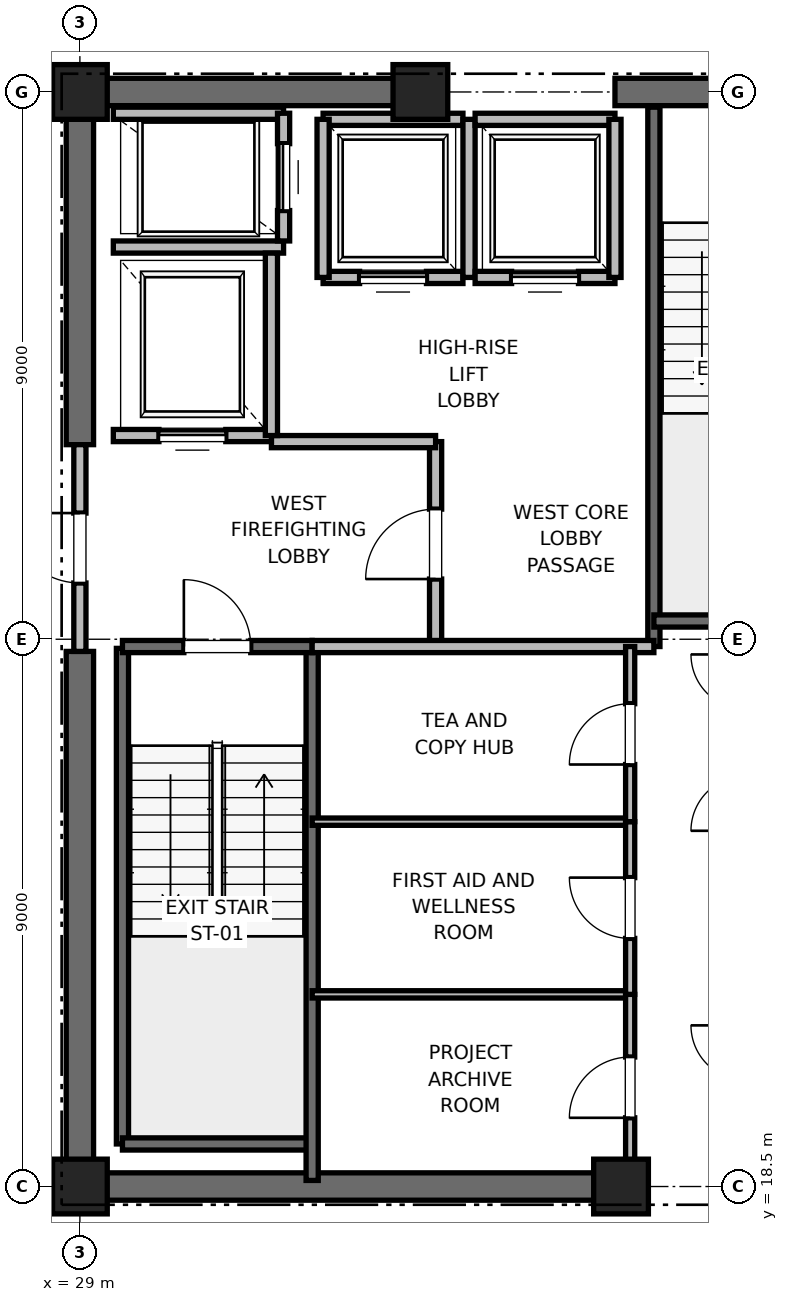
"""IFC4 building model, lengths in metres.
Left out: names, types, materials, properties, quantities, classifications, styles, units other than length and angle.
Written with IfcOpenShell. Run it as: python <this file> out.ifc"""

import sys

from ifc_helpers import new_model, si_unit, direction, frame, frame_2d, origin, origin_2d, place, context, subcontext, project, spatial, rectangle, extrude, element, fill, save


model = new_model("IFC4")
c1 = context("Model", 3, precision=1e-05, world=origin(), true_north=direction((0.0, 1.0)))
c2 = subcontext(c1, "Body", "Model", "MODEL_VIEW")
j1 = project(units=[si_unit("LENGTHUNIT", "METRE"), si_unit("PLANEANGLEUNIT", "RADIAN")], contexts=[c1])
p1 = place(None, origin())
s1 = spatial("IfcSite", under=j1, at=p1, CompositionType="ELEMENT")
p2 = place(p1, origin())
s2 = spatial("IfcBuilding", under=s1, at=p2, CompositionType="ELEMENT")
p3 = place(p2, frame((0.0, 0.0, 259.2)))
s3 = spatial("IfcBuildingStorey", under=s2, at=p3, CompositionType="ELEMENT", Elevation=259.2)
for number, where, z_axis, x_axis in (
    (1, (29.0, 18.5, 0.0), (0.0, 0.0, 1.0), (1.0, 0.0, 0.0)),
    (2, (29.0, 36.5, 0.0), (0.0, 0.0, 1.0), (1.0, 0.0, 0.0)),
    (3, (37.9, 18.5, 0.0), (0.0, 0.0, 1.0), (1.0, 0.0, 0.0)),
    (4, (34.6, 36.5, 0.0), (0.0, 0.0, 1.0), (1.0, 0.0, 0.0)),
):
    element("IfcColumn", number, at=place(p3, frame(where, z_axis=z_axis, x_axis=x_axis)), inside=s3, PredefinedType="PILASTER", context=c2, shape_type="SweptSolid", body=[
        extrude(rectangle(XDim=0.9, YDim=0.9, at=origin_2d()), origin(), (0.0, 0.0, 1.0), 4.0),
    ])
p4 = place(p3, frame((29.0, 18.5, 0.0), z_axis=(0.0, 0.0, 1.0), x_axis=(1.0, 0.0, 0.0)))
e5 = element("IfcWall", 5, at=p4, inside=s3, PredefinedType="SHEAR", context=c2, shape_type="SweptSolid", body=[
    extrude(rectangle(XDim=9.2, YDim=0.45, at=frame_2d((4.6, 0.0))), origin(), (0.0, 0.0, 1.0), 3.785),
])
p5 = place(p3, frame((29.0, 36.5, 0.0), z_axis=(0.0, 0.0, 1.0), x_axis=(1.0, 0.0, 0.0)))
e6 = element("IfcWall", 6, at=p5, inside=s3, PredefinedType="SHEAR", context=c2, shape_type="SweptSolid", body=[
    extrude(rectangle(XDim=5.8, YDim=0.45, at=frame_2d((2.9, 0.0))), origin(), (0.0, 0.0, 1.0), 3.785),
])
p6 = place(p3, frame((37.8, 36.5, 0.0), z_axis=(0.0, 0.0, 1.0), x_axis=(1.0, 0.0, 0.0)))
e7 = element("IfcWall", 7, at=p6, inside=s3, PredefinedType="SHEAR", context=c2, shape_type="SweptSolid", body=[
    extrude(rectangle(XDim=4.4, YDim=0.45, at=frame_2d((2.2, 0.0))), origin(), (0.0, 0.0, 1.0), 3.785),
])
p7 = place(p6, frame((1.65, 0.0, 0.0)))
e8 = element("IfcOpeningElement", 8, at=p7, cuts=e7, PredefinedType="OPENING", context=c2, shape_type="SweptSolid", body=[
    extrude(rectangle(XDim=1.1, YDim=2.15, at=frame_2d((0.55, 1.075))), frame((0.0, 0.225, 0.0), z_axis=(0.0, -1.0, 0.0), x_axis=(1.0, 0.0, 0.0)), (0.0, 0.0, 1.0), 0.45),
])
p8 = place(p3, frame((29.0, 18.5, 0.0), z_axis=(0.0, 0.0, 1.0), x_axis=(0.0, 1.0, 0.0)))
e9 = element("IfcWall", 9, at=p8, inside=s3, PredefinedType="SHEAR", context=c2, shape_type="SweptSolid", body=[
    extrude(rectangle(XDim=8.8, YDim=0.45, at=frame_2d((4.4, 0.0))), origin(), (0.0, 0.0, 1.0), 3.785),
])
p9 = place(p3, frame((29.0, 30.7, 0.0), z_axis=(0.0, 0.0, 1.0), x_axis=(0.0, 1.0, 0.0)))
e10 = element("IfcWall", 10, at=p9, inside=s3, PredefinedType="SHEAR", context=c2, shape_type="SweptSolid", body=[
    extrude(rectangle(XDim=5.8, YDim=0.45, at=frame_2d((2.9, 0.0))), origin(), (0.0, 0.0, 1.0), 3.785),
])
p10 = place(p3, frame((29.7, 19.2, 0.0), z_axis=(0.0, 0.0, 1.0), x_axis=(0.0, 1.0, 0.0)))
e11 = element("IfcWall", 11, at=p10, inside=s3, PredefinedType="SOLIDWALL", context=c2, shape_type="SweptSolid", body=[
    extrude(rectangle(XDim=8.15, YDim=0.2, at=frame_2d((4.075, 0.0))), origin(), (0.0, 0.0, 1.0), 3.785),
])
p11 = place(p3, frame((29.7, 19.2, 0.0), z_axis=(0.0, 0.0, 1.0), x_axis=(1.0, 0.0, 0.0)))
e12 = element("IfcWall", 12, at=p11, inside=s3, PredefinedType="SOLIDWALL", context=c2, shape_type="SweptSolid", body=[
    extrude(rectangle(XDim=3.12, YDim=0.2, at=frame_2d((1.56, 0.0))), origin(), (0.0, 0.0, 1.0), 3.785),
])
p12 = place(p3, frame((32.82, 18.6, 0.0), z_axis=(0.0, 0.0, 1.0), x_axis=(0.0, 1.0, 0.0)))
e13 = element("IfcWall", 13, at=p12, inside=s3, PredefinedType="SOLIDWALL", context=c2, shape_type="SweptSolid", body=[
    extrude(rectangle(XDim=8.78, YDim=0.2, at=frame_2d((4.39, 0.0))), origin(), (0.0, 0.0, 1.0), 3.785),
])
p13 = place(p3, frame((29.7, 27.38, 0.0), z_axis=(0.0, 0.0, 1.0), x_axis=(1.0, 0.0, 0.0)))
e14 = element("IfcWall", 14, at=p13, inside=s3, PredefinedType="SOLIDWALL", context=c2, shape_type="SweptSolid", body=[
    extrude(rectangle(XDim=3.12, YDim=0.2, at=frame_2d((1.56, 0.0))), origin(), (0.0, 0.0, 1.0), 3.785),
])
p14 = place(p13, frame((1.01, 0.0, 0.0)))
e15 = element("IfcOpeningElement", 15, at=p14, cuts=e14, PredefinedType="OPENING", context=c2, shape_type="SweptSolid", body=[
    extrude(rectangle(XDim=1.1, YDim=2.15, at=frame_2d((0.55, 1.075))), frame((0.0, 0.1, 0.0), z_axis=(0.0, -1.0, 0.0), x_axis=(1.0, 0.0, 0.0)), (0.0, 0.0, 1.0), 0.2),
])
p15 = place(p3, frame((38.44, 27.38, 0.0), z_axis=(0.0, 0.0, 1.0), x_axis=(0.0, 1.0, 0.0)))
e16 = element("IfcWall", 16, at=p15, inside=s3, PredefinedType="SOLIDWALL", context=c2, shape_type="SweptSolid", body=[
    extrude(rectangle(XDim=8.87, YDim=0.2, at=frame_2d((4.435, 0.0))), origin(), (0.0, 0.0, 1.0), 3.785),
])
p16 = place(p3, frame((38.44, 27.8, 0.0), z_axis=(0.0, 0.0, 1.0), x_axis=(1.0, 0.0, 0.0)))
e17 = element("IfcWall", 17, at=p16, inside=s3, PredefinedType="SOLIDWALL", context=c2, shape_type="SweptSolid", body=[
    extrude(rectangle(XDim=3.32, YDim=0.2, at=frame_2d((1.66, 0.0))), origin(), (0.0, 0.0, 1.0), 3.785),
])
p17 = place(p3, frame((34.85, 27.38, 0.0), z_axis=(0.0, 0.0, 1.0), x_axis=(0.0, 1.0, 0.0)))
e18 = element("IfcWall", 18, at=p17, inside=s3, PredefinedType="PARTITIONING", context=c2, shape_type="SweptSolid", body=[
    extrude(rectangle(XDim=3.37, YDim=0.2, at=frame_2d((1.685, 0.0))), origin(), (0.0, 0.0, 1.0), 3.785),
])
p18 = place(p17, frame((1.11, 0.0, 0.0)))
e19 = element("IfcOpeningElement", 19, at=p18, cuts=e18, PredefinedType="OPENING", context=c2, shape_type="SweptSolid", body=[
    extrude(rectangle(XDim=1.15, YDim=2.2, at=frame_2d((0.575, 1.1))), frame((0.0, 0.1, 0.0), z_axis=(0.0, -1.0, 0.0), x_axis=(1.0, 0.0, 0.0)), (0.0, 0.0, 1.0), 0.2),
])
p19 = place(p3, frame((29.0, 27.3, 0.0), z_axis=(0.0, 0.0, 1.0), x_axis=(0.0, 1.0, 0.0)))
e20 = element("IfcWall", 20, at=p19, inside=s3, PredefinedType="PARTITIONING", context=c2, shape_type="SweptSolid", body=[
    extrude(rectangle(XDim=3.4, YDim=0.2, at=frame_2d((1.7, 0.0))), origin(), (0.0, 0.0, 1.0), 2.865),
])
p20 = place(p19, frame((1.125, 0.0, 0.0)))
e21 = element("IfcOpeningElement", 21, at=p20, cuts=e20, PredefinedType="OPENING", context=c2, shape_type="SweptSolid", body=[
    extrude(rectangle(XDim=1.15, YDim=2.2, at=frame_2d((0.575, 1.1))), frame((0.0, 0.1, 0.0), z_axis=(0.0, -1.0, 0.0), x_axis=(1.0, 0.0, 0.0)), (0.0, 0.0, 1.0), 0.2),
])
p21 = place(p3, frame((32.82, 27.38, 0.0), z_axis=(0.0, 0.0, 1.0), x_axis=(1.0, 0.0, 0.0)))
e22 = element("IfcWall", 22, at=p21, inside=s3, PredefinedType="PARTITIONING", context=c2, shape_type="SweptSolid", body=[
    extrude(rectangle(XDim=5.62, YDim=0.2, at=frame_2d((2.81, 0.0))), origin(), (0.0, 0.0, 1.0), 3.785),
])
p22 = place(p3, frame((32.15, 30.75, 0.0), z_axis=(0.0, 0.0, 1.0), x_axis=(1.0, 0.0, 0.0)))
e23 = element("IfcWall", 23, at=p22, inside=s3, PredefinedType="PARTITIONING", context=c2, shape_type="SweptSolid", body=[
    extrude(rectangle(XDim=2.7, YDim=0.2, at=frame_2d((1.35, 0.0))), origin(), (0.0, 0.0, 1.0), 3.785),
])
p23 = place(p3, frame((29.55, 30.85, 0.0), z_axis=(0.0, 0.0, 1.0), x_axis=(1.0, 0.0, 0.0)))
e24 = element("IfcWall", 24, at=p23, inside=s3, PredefinedType="SOLIDWALL", context=c2, shape_type="SweptSolid", body=[
    extrude(rectangle(XDim=2.6, YDim=0.2, at=frame_2d((1.3, 0.0))), origin(), (0.0, 0.0, 1.0), 2.865),
])
p24 = place(p23, frame((0.75, 0.0, 0.0)))
e25 = element("IfcOpeningElement", 25, at=p24, cuts=e24, PredefinedType="OPENING", context=c2, shape_type="SweptSolid", body=[
    extrude(rectangle(XDim=1.1, YDim=2.2, at=frame_2d((0.55, 1.1))), frame((0.0, 0.1, 0.0), z_axis=(0.0, -1.0, 0.0), x_axis=(1.0, 0.0, 0.0)), (0.0, 0.0, 1.0), 0.2),
])
p25 = place(p3, frame((29.55, 33.95, 0.0), z_axis=(0.0, 0.0, 1.0), x_axis=(1.0, 0.0, 0.0)))
e26 = element("IfcWall", 26, at=p25, inside=s3, PredefinedType="SOLIDWALL", context=c2, shape_type="SweptSolid", body=[
    extrude(rectangle(XDim=2.8, YDim=0.2, at=frame_2d((1.4, 0.0))), origin(), (0.0, 0.0, 1.0), 3.785),
])
p26 = place(p3, frame((32.15, 30.85, 0.0), z_axis=(0.0, 0.0, 1.0), x_axis=(0.0, 1.0, 0.0)))
e27 = element("IfcWall", 27, at=p26, inside=s3, PredefinedType="SOLIDWALL", context=c2, shape_type="SweptSolid", body=[
    extrude(rectangle(XDim=3.0, YDim=0.2, at=frame_2d((1.5, 0.0))), origin(), (0.0, 0.0, 1.0), 3.785),
])
p27 = place(p3, frame((32.35, 36.15, 0.0), z_axis=(0.0, 0.0, 1.0), x_axis=(-1.0, 0.0, 0.0)))
e28 = element("IfcWall", 28, at=p27, inside=s3, PredefinedType="SOLIDWALL", context=c2, shape_type="SweptSolid", body=[
    extrude(rectangle(XDim=2.8, YDim=0.2, at=frame_2d((1.4, 0.0))), origin(), (0.0, 0.0, 1.0), 3.148),
])
p28 = place(p3, frame((32.35, 34.05, 0.0), z_axis=(0.0, 0.0, 1.0), x_axis=(0.0, 1.0, 0.0)))
e29 = element("IfcWall", 29, at=p28, inside=s3, PredefinedType="SOLIDWALL", context=c2, shape_type="SweptSolid", body=[
    extrude(rectangle(XDim=2.1, YDim=0.2, at=frame_2d((1.05, 0.0))), origin(), (0.0, 0.0, 1.0), 3.785),
])
p29 = place(p28, frame((0.5, 0.0, 0.0)))
e30 = element("IfcOpeningElement", 30, at=p29, cuts=e29, PredefinedType="OPENING", context=c2, shape_type="SweptSolid", body=[
    extrude(rectangle(XDim=1.1, YDim=2.2, at=frame_2d((0.55, 1.1))), frame((0.0, 0.1, 0.0), z_axis=(0.0, -1.0, 0.0), x_axis=(1.0, 0.0, 0.0)), (0.0, 0.0, 1.0), 0.2),
])
p30 = place(p3, frame((33.0, 33.45, 0.0), z_axis=(0.0, 0.0, 1.0), x_axis=(1.0, 0.0, 0.0)))
e31 = element("IfcWall", 31, at=p30, inside=s3, PredefinedType="SOLIDWALL", context=c2, shape_type="SweptSolid", body=[
    extrude(rectangle(XDim=2.3, YDim=0.2, at=frame_2d((1.15, 0.0))), origin(), (0.0, 0.0, 1.0), 3.785),
])
p31 = place(p30, frame((0.6, 0.0, 0.0)))
e32 = element("IfcOpeningElement", 32, at=p31, cuts=e31, PredefinedType="OPENING", context=c2, shape_type="SweptSolid", body=[
    extrude(rectangle(XDim=1.1, YDim=2.2, at=frame_2d((0.55, 1.1))), frame((0.0, 0.1, 0.0), z_axis=(0.0, -1.0, 0.0), x_axis=(1.0, 0.0, 0.0)), (0.0, 0.0, 1.0), 0.2),
])
p32 = place(p3, frame((35.3, 36.05, 0.0), z_axis=(0.0, 0.0, 1.0), x_axis=(-1.0, 0.0, 0.0)))
e33 = element("IfcWall", 33, at=p32, inside=s3, PredefinedType="SOLIDWALL", context=c2, shape_type="SweptSolid", body=[
    extrude(rectangle(XDim=2.3, YDim=0.2, at=frame_2d((1.15, 0.0))), origin(), (0.0, 0.0, 1.0), 2.865),
])
p33 = place(p3, frame((33.0, 36.05, 0.0), z_axis=(0.0, 0.0, 1.0), x_axis=(0.0, -1.0, 0.0)))
e34 = element("IfcWall", 34, at=p33, inside=s3, PredefinedType="SOLIDWALL", context=c2, shape_type="SweptSolid", body=[
    extrude(rectangle(XDim=2.6, YDim=0.2, at=frame_2d((1.3, 0.0))), origin(), (0.0, 0.0, 1.0), 3.785),
])
p34 = place(p3, frame((35.4, 33.45, 0.0), z_axis=(0.0, 0.0, 1.0), x_axis=(0.0, 1.0, 0.0)))
e35 = element("IfcWall", 35, at=p34, inside=s3, PredefinedType="SOLIDWALL", context=c2, shape_type="SweptSolid", body=[
    extrude(rectangle(XDim=2.6, YDim=0.2, at=frame_2d((1.3, 0.0))), origin(), (0.0, 0.0, 1.0), 2.865),
])
p35 = place(p3, frame((35.5, 33.45, 0.0), z_axis=(0.0, 0.0, 1.0), x_axis=(1.0, 0.0, 0.0)))
e36 = element("IfcWall", 36, at=p35, inside=s3, PredefinedType="SOLIDWALL", context=c2, shape_type="SweptSolid", body=[
    extrude(rectangle(XDim=2.3, YDim=0.2, at=frame_2d((1.15, 0.0))), origin(), (0.0, 0.0, 1.0), 3.785),
])
p36 = place(p35, frame((0.6, 0.0, 0.0)))
e37 = element("IfcOpeningElement", 37, at=p36, cuts=e36, PredefinedType="OPENING", context=c2, shape_type="SweptSolid", body=[
    extrude(rectangle(XDim=1.1, YDim=2.2, at=frame_2d((0.55, 1.1))), frame((0.0, 0.1, 0.0), z_axis=(0.0, -1.0, 0.0), x_axis=(1.0, 0.0, 0.0)), (0.0, 0.0, 1.0), 0.2),
])
p37 = place(p3, frame((37.8, 36.05, 0.0), z_axis=(0.0, 0.0, 1.0), x_axis=(-1.0, 0.0, 0.0)))
e38 = element("IfcWall", 38, at=p37, inside=s3, PredefinedType="SOLIDWALL", context=c2, shape_type="SweptSolid", body=[
    extrude(rectangle(XDim=2.3, YDim=0.2, at=frame_2d((1.15, 0.0))), origin(), (0.0, 0.0, 1.0), 2.865),
])
p38 = place(p3, frame((37.8, 33.45, 0.0), z_axis=(0.0, 0.0, 1.0), x_axis=(0.0, 1.0, 0.0)))
e39 = element("IfcWall", 39, at=p38, inside=s3, PredefinedType="SOLIDWALL", context=c2, shape_type="SweptSolid", body=[
    extrude(rectangle(XDim=2.6, YDim=0.2, at=frame_2d((1.3, 0.0))), origin(), (0.0, 0.0, 1.0), 2.865),
])
for number, where, z_axis, x_axis in (
    (40, (32.82, 21.66, 0.0), (0.0, 0.0, 1.0), (1.0, 0.0, 0.0)),
    (41, (32.82, 24.5, 0.0), (0.0, 0.0, 1.0), (1.0, 0.0, 0.0)),
):
    element("IfcWall", number, at=place(p3, frame(where, z_axis=z_axis, x_axis=x_axis)), inside=s3, PredefinedType="PARTITIONING", context=c2, shape_type="SweptSolid", body=[
        extrude(rectangle(XDim=5.23, YDim=0.12, at=frame_2d((2.615, 0.0))), origin(), (0.0, 0.0, 1.0), 2.85),
    ])
p39 = place(p3, frame((38.05, 18.6, 0.0), z_axis=(0.0, 0.0, 1.0), x_axis=(0.0, 1.0, 0.0)))
e42 = element("IfcWall", 42, at=p39, inside=s3, PredefinedType="PARTITIONING", context=c2, shape_type="SweptSolid", body=[
    extrude(rectangle(XDim=3.06, YDim=0.15, at=frame_2d((1.53, 0.0))), origin(), (0.0, 0.0, 1.0), 2.85),
])
p40 = place(p39, frame((1.03, 0.0, 0.0)))
e43 = element("IfcOpeningElement", 43, at=p40, cuts=e42, PredefinedType="OPENING", context=c2, shape_type="SweptSolid", body=[
    extrude(rectangle(XDim=1.0, YDim=2.15, at=frame_2d((0.5, 1.075))), frame((0.0, 0.075, 0.0), z_axis=(0.0, -1.0, 0.0), x_axis=(1.0, 0.0, 0.0)), (0.0, 0.0, 1.0), 0.15),
])
p41 = place(p3, frame((38.05, 21.66, 0.0), z_axis=(0.0, 0.0, 1.0), x_axis=(0.0, 1.0, 0.0)))
e44 = element("IfcWall", 44, at=p41, inside=s3, PredefinedType="PARTITIONING", context=c2, shape_type="SweptSolid", body=[
    extrude(rectangle(XDim=2.84, YDim=0.15, at=frame_2d((1.42, 0.0))), origin(), (0.0, 0.0, 1.0), 2.85),
])
p42 = place(p41, frame((0.92, 0.0, 0.0)))
e45 = element("IfcOpeningElement", 45, at=p42, cuts=e44, PredefinedType="OPENING", context=c2, shape_type="SweptSolid", body=[
    extrude(rectangle(XDim=1.0, YDim=2.15, at=frame_2d((0.5, 1.075))), frame((0.0, 0.075, 0.0), z_axis=(0.0, -1.0, 0.0), x_axis=(1.0, 0.0, 0.0)), (0.0, 0.0, 1.0), 0.15),
])
p43 = place(p3, frame((38.05, 24.5, 0.0), z_axis=(0.0, 0.0, 1.0), x_axis=(0.0, 1.0, 0.0)))
e46 = element("IfcWall", 46, at=p43, inside=s3, PredefinedType="PARTITIONING", context=c2, shape_type="SweptSolid", body=[
    extrude(rectangle(XDim=2.88, YDim=0.15, at=frame_2d((1.44, 0.0))), origin(), (0.0, 0.0, 1.0), 2.85),
])
p44 = place(p43, frame((0.94, 0.0, 0.0)))
e47 = element("IfcOpeningElement", 47, at=p44, cuts=e46, PredefinedType="OPENING", context=c2, shape_type="SweptSolid", body=[
    extrude(rectangle(XDim=1.0, YDim=2.15, at=frame_2d((0.5, 1.075))), frame((0.0, 0.075, 0.0), z_axis=(0.0, -1.0, 0.0), x_axis=(1.0, 0.0, 0.0)), (0.0, 0.0, 1.0), 0.15),
])
p45 = place(p14, origin())
e48 = element("IfcDoor", 48, at=p45, inside=s3, OperationType="SINGLE_SWING_LEFT", PredefinedType="DOOR", context=c2, shape_type="SweptSolid", body=[
    extrude(rectangle(XDim=1.1, YDim=2.15, at=frame_2d((0.55, 1.075))), frame((0.0, 0.025, 0.0), z_axis=(0.0, -1.0, 0.0), x_axis=(1.0, 0.0, 0.0)), (0.0, 0.0, 1.0), 0.05),
])
fill(e15, e48)
p46 = place(p18, origin())
e49 = element("IfcDoor", 49, at=p46, inside=s3, OperationType="SINGLE_SWING_LEFT", PredefinedType="DOOR", context=c2, shape_type="SweptSolid", body=[
    extrude(rectangle(XDim=1.15, YDim=2.2, at=frame_2d((0.575, 1.1))), frame((0.0, 0.025, 0.0), z_axis=(0.0, -1.0, 0.0), x_axis=(1.0, 0.0, 0.0)), (0.0, 0.0, 1.0), 0.05),
])
fill(e19, e49)
p47 = place(p20, origin())
e50 = element("IfcDoor", 50, at=p47, inside=s3, OperationType="SINGLE_SWING_RIGHT", PredefinedType="DOOR", context=c2, shape_type="SweptSolid", body=[
    extrude(rectangle(XDim=1.15, YDim=2.2, at=frame_2d((0.575, 1.1))), frame((0.0, 0.025, 0.0), z_axis=(0.0, -1.0, 0.0), x_axis=(1.0, 0.0, 0.0)), (0.0, 0.0, 1.0), 0.05),
])
fill(e21, e50)
p48 = place(p24, origin())
e51 = element("IfcDoor", 51, at=p48, inside=s3, OperationType="SLIDING_TO_RIGHT", PredefinedType="DOOR", context=c2, shape_type="SweptSolid", body=[
    extrude(rectangle(XDim=1.1, YDim=2.2, at=frame_2d((0.55, 1.1))), frame((0.0, 0.025, 0.0), z_axis=(0.0, -1.0, 0.0), x_axis=(1.0, 0.0, 0.0)), (0.0, 0.0, 1.0), 0.05),
])
fill(e25, e51)
p49 = place(p29, origin())
e52 = element("IfcDoor", 52, at=p49, inside=s3, OperationType="SLIDING_TO_RIGHT", PredefinedType="DOOR", context=c2, shape_type="SweptSolid", body=[
    extrude(rectangle(XDim=1.1, YDim=2.2, at=frame_2d((0.55, 1.1))), frame((0.0, 0.025, 0.0), z_axis=(0.0, -1.0, 0.0), x_axis=(1.0, 0.0, 0.0)), (0.0, 0.0, 1.0), 0.05),
])
fill(e30, e52)
p50 = place(p31, origin())
e53 = element("IfcDoor", 53, at=p50, inside=s3, OperationType="SLIDING_TO_RIGHT", PredefinedType="DOOR", context=c2, shape_type="SweptSolid", body=[
    extrude(rectangle(XDim=1.1, YDim=2.2, at=frame_2d((0.55, 1.1))), frame((0.0, 0.025, 0.0), z_axis=(0.0, -1.0, 0.0), x_axis=(1.0, 0.0, 0.0)), (0.0, 0.0, 1.0), 0.05),
])
fill(e32, e53)
p51 = place(p36, origin())
e54 = element("IfcDoor", 54, at=p51, inside=s3, OperationType="SLIDING_TO_RIGHT", PredefinedType="DOOR", context=c2, shape_type="SweptSolid", body=[
    extrude(rectangle(XDim=1.1, YDim=2.2, at=frame_2d((0.55, 1.1))), frame((0.0, 0.025, 0.0), z_axis=(0.0, -1.0, 0.0), x_axis=(1.0, 0.0, 0.0)), (0.0, 0.0, 1.0), 0.05),
])
fill(e37, e54)
p52 = place(p40, origin())
e55 = element("IfcDoor", 55, at=p52, inside=s3, OperationType="SINGLE_SWING_LEFT", PredefinedType="DOOR", context=c2, shape_type="SweptSolid", body=[
    extrude(rectangle(XDim=1.0, YDim=2.15, at=frame_2d((0.5, 1.075))), frame((0.0, 0.025, 0.0), z_axis=(0.0, -1.0, 0.0), x_axis=(1.0, 0.0, 0.0)), (0.0, 0.0, 1.0), 0.05),
])
fill(e43, e55)
p53 = place(p42, origin())
e56 = element("IfcDoor", 56, at=p53, inside=s3, OperationType="SINGLE_SWING_RIGHT", PredefinedType="DOOR", context=c2, shape_type="SweptSolid", body=[
    extrude(rectangle(XDim=1.0, YDim=2.15, at=frame_2d((0.5, 1.075))), frame((0.0, 0.025, 0.0), z_axis=(0.0, -1.0, 0.0), x_axis=(1.0, 0.0, 0.0)), (0.0, 0.0, 1.0), 0.05),
])
fill(e45, e56)
p54 = place(p44, origin())
e57 = element("IfcDoor", 57, at=p54, inside=s3, OperationType="SINGLE_SWING_LEFT", PredefinedType="DOOR", context=c2, shape_type="SweptSolid", body=[
    extrude(rectangle(XDim=1.0, YDim=2.15, at=frame_2d((0.5, 1.075))), frame((0.0, 0.025, 0.0), z_axis=(0.0, -1.0, 0.0), x_axis=(1.0, 0.0, 0.0)), (0.0, 0.0, 1.0), 0.05),
])
fill(e47, e57)
save(model, sys.argv[1])
